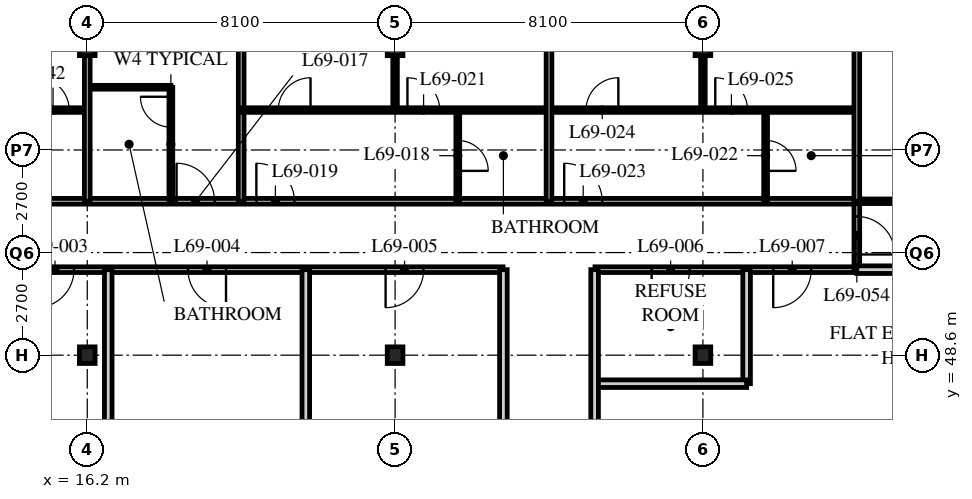
"""IFC4 building model, lengths in metres.
Left out: names, types, materials, properties, quantities, classifications, styles, units other than length and angle.
Written with IfcOpenShell. Run it as: python <this file> out.ifc"""

import sys

from ifc_helpers import new_model, si_unit, direction, frame, frame_2d, origin, origin_2d, place, context, subcontext, project, spatial, rectangle, i_section, extrude, element, fill, save


model = new_model("IFC4")
c1 = context("Model", 3, precision=1e-05, world=origin(), true_north=direction((0.0, 1.0)))
c2 = subcontext(c1, "Body", "Model", "MODEL_VIEW")
j1 = project(units=[si_unit("LENGTHUNIT", "METRE"), si_unit("PLANEANGLEUNIT", "RADIAN")], contexts=[c1])
p1 = place(None, origin())
s1 = spatial("IfcSite", under=j1, at=p1, CompositionType="ELEMENT")
p2 = place(p1, origin())
s2 = spatial("IfcBuilding", under=s1, at=p2, CompositionType="ELEMENT")
p3 = place(p2, frame((0.0, 0.0, 269.7)))
s3 = spatial("IfcBuildingStorey", under=s2, at=p3, CompositionType="ELEMENT", Elevation=269.7)
for number, where, z_axis, x_axis in (
    (1, (16.2, 48.6, 0.0), (0.0, 0.0, 1.0), (1.0, 0.0, 0.0)),
    (2, (16.2, 56.7, 0.0), (0.0, 0.0, 1.0), (1.0, 0.0, 0.0)),
    (3, (24.3, 48.6, 0.0), (0.0, 0.0, 1.0), (1.0, 0.0, 0.0)),
    (4, (24.3, 56.7, 0.0), (0.0, 0.0, 1.0), (1.0, 0.0, 0.0)),
    (5, (32.4, 48.6, 0.0), (0.0, 0.0, 1.0), (1.0, 0.0, 0.0)),
    (6, (32.4, 56.7, 0.0), (0.0, 0.0, 1.0), (1.0, 0.0, 0.0)),
):
    element("IfcColumn", number, at=place(p3, frame(where, z_axis=z_axis, x_axis=x_axis)), inside=s3, PredefinedType="COLUMN", context=c2, shape_type="SweptSolid", body=[
        extrude(i_section(OverallWidth=0.412, OverallDepth=0.437, WebThickness=0.036, FlangeThickness=0.058, FilletRadius=0.015, at=origin_2d()), origin(), (0.0, 0.0, 1.0), 3.9),
    ])
p4 = place(p3, frame((12.15, 52.65, 0.0), z_axis=(0.0, 0.0, 1.0), x_axis=(1.0, 0.0, 0.0)))
e7 = element("IfcWall", 7, at=p4, inside=s3, PredefinedType="PARTITIONING", context=c2, shape_type="SweptSolid", body=[
    extrude(rectangle(XDim=24.3, YDim=0.15, at=frame_2d((12.15, 0.0))), origin(), (0.0, 0.0, 1.0), 3.69),
])
p5 = place(p4, frame((6.4, 0.0, 0.0)))
e8 = element("IfcOpeningElement", 8, at=p5, cuts=e7, PredefinedType="OPENING", context=c2, shape_type="SweptSolid", body=[
    extrude(rectangle(XDim=1.0, YDim=2.1, at=frame_2d((0.5, 1.05))), frame((0.0, 0.085, 0.0), z_axis=(0.0, -1.0, 0.0), x_axis=(1.0, 0.0, 0.0)), (0.0, 0.0, 1.0), 0.17),
])
p6 = place(p4, frame((8.5, 0.0, 0.0)))
e9 = element("IfcOpeningElement", 9, at=p6, cuts=e7, PredefinedType="OPENING", context=c2, shape_type="SweptSolid", body=[
    extrude(rectangle(XDim=1.0, YDim=2.1, at=frame_2d((0.5, 1.05))), frame((0.0, 0.085, 0.0), z_axis=(0.0, -1.0, 0.0), x_axis=(1.0, 0.0, 0.0)), (0.0, 0.0, 1.0), 0.17),
])
p7 = place(p4, frame((16.6, 0.0, 0.0)))
e10 = element("IfcOpeningElement", 10, at=p7, cuts=e7, PredefinedType="OPENING", context=c2, shape_type="SweptSolid", body=[
    extrude(rectangle(XDim=1.0, YDim=2.1, at=frame_2d((0.5, 1.05))), frame((0.0, 0.085, 0.0), z_axis=(0.0, -1.0, 0.0), x_axis=(1.0, 0.0, 0.0)), (0.0, 0.0, 1.0), 0.17),
])
p8 = place(p4, frame((1.525, 0.0, 0.0)))
e11 = element("IfcOpeningElement", 11, at=p8, cuts=e7, PredefinedType="OPENING", context=c2, shape_type="SweptSolid", body=[
    extrude(rectangle(XDim=1.0, YDim=2.1, at=frame_2d((0.5, 1.05))), frame((0.0, 0.085, 0.0), z_axis=(0.0, -1.0, 0.0), x_axis=(1.0, 0.0, 0.0)), (0.0, 0.0, 1.0), 0.17),
])
p9 = place(p3, frame((13.95, 50.85, 0.0), z_axis=(0.0, 0.0, 1.0), x_axis=(1.0, 0.0, 0.0)))
e12 = element("IfcWall", 12, at=p9, inside=s3, PredefinedType="PARTITIONING", context=c2, shape_type="SweptSolid", body=[
    extrude(rectangle(XDim=13.19, YDim=0.15, at=frame_2d((6.595, 0.0))), origin(), (0.0, 0.0, 1.0), 3.69),
])
p10 = place(p9, frame((0.901, 0.0, 0.0)))
e13 = element("IfcOpeningElement", 13, at=p10, cuts=e12, PredefinedType="OPENING", context=c2, shape_type="SweptSolid", body=[
    extrude(rectangle(XDim=1.0, YDim=2.1, at=frame_2d((0.5, 1.05))), frame((0.0, 0.085, 0.0), z_axis=(0.0, -1.0, 0.0), x_axis=(1.0, 0.0, 0.0)), (0.0, 0.0, 1.0), 0.17),
])
p11 = place(p9, frame((4.901, 0.0, 0.0)))
e14 = element("IfcOpeningElement", 14, at=p11, cuts=e12, PredefinedType="OPENING", context=c2, shape_type="SweptSolid", body=[
    extrude(rectangle(XDim=1.0, YDim=2.1, at=frame_2d((0.5, 1.05))), frame((0.0, 0.085, 0.0), z_axis=(0.0, -1.0, 0.0), x_axis=(1.0, 0.0, 0.0)), (0.0, 0.0, 1.0), 0.17),
])
p12 = place(p9, frame((10.101, 0.0, 0.0)))
e15 = element("IfcOpeningElement", 15, at=p12, cuts=e12, PredefinedType="OPENING", context=c2, shape_type="SweptSolid", body=[
    extrude(rectangle(XDim=1.0, YDim=2.1, at=frame_2d((0.5, 1.05))), frame((0.0, 0.085, 0.0), z_axis=(0.0, -1.0, 0.0), x_axis=(1.0, 0.0, 0.0)), (0.0, 0.0, 1.0), 0.17),
])
p13 = place(p3, frame((29.56, 50.85, 0.0), z_axis=(0.0, 0.0, 1.0), x_axis=(1.0, 0.0, 0.0)))
e16 = element("IfcWall", 16, at=p13, inside=s3, PredefinedType="PARTITIONING", context=c2, shape_type="SweptSolid", body=[
    extrude(rectangle(XDim=6.89, YDim=0.15, at=frame_2d((3.445, 0.0))), origin(), (0.0, 0.0, 1.0), 3.69),
])
p14 = place(p13, frame((1.49, 0.0, 0.0)))
e17 = element("IfcOpeningElement", 17, at=p14, cuts=e16, PredefinedType="OPENING", context=c2, shape_type="SweptSolid", body=[
    extrude(rectangle(XDim=1.0, YDim=2.1, at=frame_2d((0.5, 1.05))), frame((0.0, 0.085, 0.0), z_axis=(0.0, -1.0, 0.0), x_axis=(1.0, 0.0, 0.0)), (0.0, 0.0, 1.0), 0.17),
])
p15 = place(p13, frame((4.69, 0.0, 0.0)))
e18 = element("IfcOpeningElement", 18, at=p15, cuts=e16, PredefinedType="OPENING", context=c2, shape_type="SweptSolid", body=[
    extrude(rectangle(XDim=1.0, YDim=2.1, at=frame_2d((0.5, 1.05))), frame((0.0, 0.085, 0.0), z_axis=(0.0, -1.0, 0.0), x_axis=(1.0, 0.0, 0.0)), (0.0, 0.0, 1.0), 0.17),
])
for number, where, z_axis, x_axis in (
    (19, (16.752, 50.85, 0.0), (0.0, 0.0, 1.0), (0.0, -1.0, 0.0)),
    (20, (21.951, 50.85, 0.0), (0.0, 0.0, 1.0), (0.0, -1.0, 0.0)),
):
    element("IfcWall", number, at=place(p3, frame(where, z_axis=z_axis, x_axis=x_axis)), inside=s3, PredefinedType="SOLIDWALL", context=c2, shape_type="SweptSolid", body=[
        extrude(rectangle(XDim=10.35, YDim=0.2, at=frame_2d((5.175, 0.0))), origin(), (0.0, 0.0, 1.0), 3.69),
    ])
p16 = place(p3, frame((33.55, 50.85, 0.0), z_axis=(0.0, 0.0, 1.0), x_axis=(0.0, -1.0, 0.0)))
e21 = element("IfcWall", 21, at=p16, inside=s3, PredefinedType="SOLIDWALL", context=c2, shape_type="SweptSolid", body=[
    extrude(rectangle(XDim=3.0, YDim=0.2, at=frame_2d((1.5, 0.0))), origin(), (0.0, 0.0, 1.0), 3.69),
])
p17 = place(p3, frame((29.55, 47.85, 0.0), z_axis=(0.0, 0.0, 1.0), x_axis=(1.0, 0.0, 0.0)))
e22 = element("IfcWall", 22, at=p17, inside=s3, PredefinedType="SOLIDWALL", context=c2, shape_type="SweptSolid", body=[
    extrude(rectangle(XDim=4.0, YDim=0.2, at=frame_2d((2.0, 0.0))), origin(), (0.0, 0.0, 1.0), 3.69),
])
for number, where, z_axis, x_axis in (
    (23, (27.15, 40.5, 0.0), (0.0, 0.0, 1.0), (0.0, 1.0, 0.0)),
    (24, (29.55, 40.5, 0.0), (0.0, 0.0, 1.0), (0.0, 1.0, 0.0)),
):
    element("IfcWall", number, at=place(p3, frame(where, z_axis=z_axis, x_axis=x_axis)), inside=s3, PredefinedType="SOLIDWALL", context=c2, shape_type="SweptSolid", body=[
        extrude(rectangle(XDim=10.35, YDim=0.2, at=frame_2d((5.175, 0.0))), origin(), (0.0, 0.0, 1.0), 3.69),
    ])
p18 = place(p3, frame((36.45, 50.85, 0.0), z_axis=(0.0, 0.0, 1.0), x_axis=(0.0, 1.0, 0.0)))
e25 = element("IfcWall", 25, at=p18, inside=s3, PredefinedType="PARTITIONING", context=c2, shape_type="SweptSolid", body=[
    extrude(rectangle(XDim=1.8, YDim=0.15, at=frame_2d((0.9, 0.0))), origin(), (0.0, 0.0, 1.0), 3.69),
])
p19 = place(p18, frame((0.4, 0.0, 0.0)))
e26 = element("IfcOpeningElement", 26, at=p19, cuts=e25, PredefinedType="OPENING", context=c2, shape_type="SweptSolid", body=[
    extrude(rectangle(XDim=1.0, YDim=2.1, at=frame_2d((0.5, 1.05))), frame((0.0, 0.085, 0.0), z_axis=(0.0, -1.0, 0.0), x_axis=(1.0, 0.0, 0.0)), (0.0, 0.0, 1.0), 0.17),
])
p20 = place(p3, frame((16.2, 55.65, 0.0), z_axis=(0.0, 0.0, 1.0), x_axis=(1.0, 0.0, 0.0)))
e27 = element("IfcWall", 27, at=p20, inside=s3, PredefinedType="PARTITIONING", context=c2, shape_type="SweptSolid", body=[
    extrude(rectangle(XDim=2.2, YDim=0.1, at=frame_2d((1.1, 0.0))), origin(), (0.0, 0.0, 1.0), 3.69),
])
p21 = place(p3, frame((18.4, 52.65, 0.0), z_axis=(0.0, 0.0, 1.0), x_axis=(0.0, 1.0, 0.0)))
e28 = element("IfcWall", 28, at=p21, inside=s3, PredefinedType="PARTITIONING", context=c2, shape_type="SweptSolid", body=[
    extrude(rectangle(XDim=3.0, YDim=0.1, at=frame_2d((1.5, 0.0))), origin(), (0.0, 0.0, 1.0), 3.69),
])
p22 = place(p21, frame((1.95, 0.0, 0.0)))
e29 = element("IfcOpeningElement", 29, at=p22, cuts=e28, PredefinedType="OPENING", context=c2, shape_type="SweptSolid", body=[
    extrude(rectangle(XDim=0.8, YDim=2.1, at=frame_2d((0.4, 1.05))), frame((0.0, 0.06, 0.0), z_axis=(0.0, -1.0, 0.0), x_axis=(1.0, 0.0, 0.0)), (0.0, 0.0, 1.0), 0.12),
])
p23 = place(p3, frame((20.25, 52.65, 0.0), z_axis=(0.0, 0.0, 1.0), x_axis=(0.0, 1.0, 0.0)))
e30 = element("IfcWall", 30, at=p23, inside=s3, PredefinedType="PARTITIONING", context=c2, shape_type="SweptSolid", body=[
    extrude(rectangle(XDim=11.85, YDim=0.15, at=frame_2d((5.925, 0.0))), origin(), (0.0, 0.0, 1.0), 3.69),
])
p24 = place(p3, frame((20.25, 55.05, 0.0), z_axis=(0.0, 0.0, 1.0), x_axis=(1.0, 0.0, 0.0)))
e31 = element("IfcWall", 31, at=p24, inside=s3, PredefinedType="PARTITIONING", context=c2, shape_type="SweptSolid", body=[
    extrude(rectangle(XDim=16.2, YDim=0.12, at=frame_2d((8.1, 0.0))), origin(), (0.0, 0.0, 1.0), 3.69),
])
p25 = place(p24, frame((0.975, 0.0, 0.0)))
e32 = element("IfcOpeningElement", 32, at=p25, cuts=e31, PredefinedType="OPENING", context=c2, shape_type="SweptSolid", body=[
    extrude(rectangle(XDim=0.85, YDim=2.1, at=frame_2d((0.425, 1.05))), frame((0.0, 0.07, 0.0), z_axis=(0.0, -1.0, 0.0), x_axis=(1.0, 0.0, 0.0)), (0.0, 0.0, 1.0), 0.14),
])
p26 = place(p24, frame((4.375, 0.0, 0.0)))
e33 = element("IfcOpeningElement", 33, at=p26, cuts=e31, PredefinedType="OPENING", context=c2, shape_type="SweptSolid", body=[
    extrude(rectangle(XDim=0.85, YDim=2.1, at=frame_2d((0.425, 1.05))), frame((0.0, 0.07, 0.0), z_axis=(0.0, -1.0, 0.0), x_axis=(1.0, 0.0, 0.0)), (0.0, 0.0, 1.0), 0.14),
])
p27 = place(p24, frame((9.075, 0.0, 0.0)))
e34 = element("IfcOpeningElement", 34, at=p27, cuts=e31, PredefinedType="OPENING", context=c2, shape_type="SweptSolid", body=[
    extrude(rectangle(XDim=0.85, YDim=2.1, at=frame_2d((0.425, 1.05))), frame((0.0, 0.07, 0.0), z_axis=(0.0, -1.0, 0.0), x_axis=(1.0, 0.0, 0.0)), (0.0, 0.0, 1.0), 0.14),
])
p28 = place(p24, frame((12.475, 0.0, 0.0)))
e35 = element("IfcOpeningElement", 35, at=p28, cuts=e31, PredefinedType="OPENING", context=c2, shape_type="SweptSolid", body=[
    extrude(rectangle(XDim=0.85, YDim=2.1, at=frame_2d((0.425, 1.05))), frame((0.0, 0.07, 0.0), z_axis=(0.0, -1.0, 0.0), x_axis=(1.0, 0.0, 0.0)), (0.0, 0.0, 1.0), 0.14),
])
p29 = place(p3, frame((25.95, 52.65, 0.0), z_axis=(0.0, 0.0, 1.0), x_axis=(0.0, 1.0, 0.0)))
e36 = element("IfcWall", 36, at=p29, inside=s3, PredefinedType="PARTITIONING", context=c2, shape_type="SweptSolid", body=[
    extrude(rectangle(XDim=2.4, YDim=0.1, at=frame_2d((1.2, 0.0))), origin(), (0.0, 0.0, 1.0), 3.69),
])
p30 = place(p29, frame((0.8, 0.0, 0.0)))
e37 = element("IfcOpeningElement", 37, at=p30, cuts=e36, PredefinedType="OPENING", context=c2, shape_type="SweptSolid", body=[
    extrude(rectangle(XDim=0.8, YDim=2.1, at=frame_2d((0.4, 1.05))), frame((0.0, 0.06, 0.0), z_axis=(0.0, -1.0, 0.0), x_axis=(1.0, 0.0, 0.0)), (0.0, 0.0, 1.0), 0.12),
])
p31 = place(p3, frame((24.3, 55.05, 0.0), z_axis=(0.0, 0.0, 1.0), x_axis=(0.0, 1.0, 0.0)))
e38 = element("IfcWall", 38, at=p31, inside=s3, PredefinedType="PARTITIONING", context=c2, shape_type="SweptSolid", body=[
    extrude(rectangle(XDim=9.45, YDim=0.12, at=frame_2d((4.725, 0.0))), origin(), (0.0, 0.0, 1.0), 3.078),
])
p32 = place(p3, frame((28.35, 52.65, 0.0), z_axis=(0.0, 0.0, 1.0), x_axis=(0.0, 1.0, 0.0)))
e39 = element("IfcWall", 39, at=p32, inside=s3, PredefinedType="PARTITIONING", context=c2, shape_type="SweptSolid", body=[
    extrude(rectangle(XDim=11.85, YDim=0.15, at=frame_2d((5.925, 0.0))), origin(), (0.0, 0.0, 1.0), 3.69),
])
p33 = place(p3, frame((34.05, 52.65, 0.0), z_axis=(0.0, 0.0, 1.0), x_axis=(0.0, 1.0, 0.0)))
e40 = element("IfcWall", 40, at=p33, inside=s3, PredefinedType="PARTITIONING", context=c2, shape_type="SweptSolid", body=[
    extrude(rectangle(XDim=2.4, YDim=0.1, at=frame_2d((1.2, 0.0))), origin(), (0.0, 0.0, 1.0), 3.69),
])
p34 = place(p33, frame((0.8, 0.0, 0.0)))
e41 = element("IfcOpeningElement", 41, at=p34, cuts=e40, PredefinedType="OPENING", context=c2, shape_type="SweptSolid", body=[
    extrude(rectangle(XDim=0.8, YDim=2.1, at=frame_2d((0.4, 1.05))), frame((0.0, 0.06, 0.0), z_axis=(0.0, -1.0, 0.0), x_axis=(1.0, 0.0, 0.0)), (0.0, 0.0, 1.0), 0.12),
])
p35 = place(p3, frame((32.4, 55.05, 0.0), z_axis=(0.0, 0.0, 1.0), x_axis=(0.0, 1.0, 0.0)))
e42 = element("IfcWall", 42, at=p35, inside=s3, PredefinedType="PARTITIONING", context=c2, shape_type="SweptSolid", body=[
    extrude(rectangle(XDim=9.45, YDim=0.12, at=frame_2d((4.725, 0.0))), origin(), (0.0, 0.0, 1.0), 3.078),
])
p36 = place(p3, frame((8.15, 55.05, 0.0), z_axis=(0.0, 0.0, 1.0), x_axis=(1.0, 0.0, 0.0)))
e43 = element("IfcWall", 43, at=p36, inside=s3, PredefinedType="PARTITIONING", context=c2, shape_type="SweptSolid", body=[
    extrude(rectangle(XDim=8.05, YDim=0.12, at=frame_2d((4.025, 0.0))), origin(), (0.0, 0.0, 1.0), 3.69),
])
p37 = place(p36, frame((6.725, 0.0, 0.0)))
e44 = element("IfcOpeningElement", 44, at=p37, cuts=e43, PredefinedType="OPENING", context=c2, shape_type="SweptSolid", body=[
    extrude(rectangle(XDim=0.85, YDim=2.1, at=frame_2d((0.425, 1.05))), frame((0.0, 0.07, 0.0), z_axis=(0.0, -1.0, 0.0), x_axis=(1.0, 0.0, 0.0)), (0.0, 0.0, 1.0), 0.14),
])
p38 = place(p36, frame((2.875, 0.0, 0.0)))
e45 = element("IfcOpeningElement", 45, at=p38, cuts=e43, PredefinedType="OPENING", context=c2, shape_type="SweptSolid", body=[
    extrude(rectangle(XDim=0.85, YDim=2.1, at=frame_2d((0.425, 1.05))), frame((0.0, 0.07, 0.0), z_axis=(0.0, -1.0, 0.0), x_axis=(1.0, 0.0, 0.0)), (0.0, 0.0, 1.0), 0.14),
])
p39 = place(p3, frame((16.2, 52.65, 0.0), z_axis=(0.0, 0.0, 1.0), x_axis=(0.0, 1.0, 0.0)))
e46 = element("IfcWall", 46, at=p39, inside=s3, PredefinedType="PARTITIONING", context=c2, shape_type="SweptSolid", body=[
    extrude(rectangle(XDim=11.85, YDim=0.15, at=frame_2d((5.925, 0.0))), origin(), (0.0, 0.0, 1.0), 3.078),
])
p40 = place(p3, frame((36.45, 52.65, 0.0), z_axis=(0.0, 0.0, 1.0), x_axis=(1.0, 0.0, 0.0)))
e47 = element("IfcWall", 47, at=p40, inside=s3, PredefinedType="PARTITIONING", context=c2, shape_type="SweptSolid", body=[
    extrude(rectangle(XDim=6.45, YDim=0.12, at=frame_2d((3.225, 0.0))), origin(), (0.0, 0.0, 1.0), 3.69),
])
p41 = place(p40, frame((2.8, 0.0, 0.0)))
e48 = element("IfcOpeningElement", 48, at=p41, cuts=e47, PredefinedType="OPENING", context=c2, shape_type="SweptSolid", body=[
    extrude(rectangle(XDim=0.85, YDim=2.1, at=frame_2d((0.425, 1.05))), frame((0.0, 0.07, 0.0), z_axis=(0.0, -1.0, 0.0), x_axis=(1.0, 0.0, 0.0)), (0.0, 0.0, 1.0), 0.14),
])
p42 = place(p3, frame((36.45, 50.85, 0.0), z_axis=(0.0, 0.0, 1.0), x_axis=(1.0, 0.0, 0.0)))
e49 = element("IfcWall", 49, at=p42, inside=s3, PredefinedType="SOLIDWALL", context=c2, shape_type="SweptSolid", body=[
    extrude(rectangle(XDim=4.05, YDim=0.2, at=frame_2d((2.025, 0.0))), origin(), (0.0, 0.0, 1.0), 3.69),
])
p43 = place(p3, frame((36.45, 64.5, 0.0), z_axis=(0.0, 0.0, 1.0), x_axis=(0.0, -1.0, 0.0)))
e50 = element("IfcWall", 50, at=p43, inside=s3, PredefinedType="PARTITIONING", context=c2, shape_type="SweptSolid", body=[
    extrude(rectangle(XDim=11.85, YDim=0.15, at=frame_2d((5.925, 0.0))), origin(), (0.0, 0.0, 1.0), 3.69),
])
p44 = place(p10, origin())
e51 = element("IfcDoor", 51, at=p44, inside=s3, OperationType="SINGLE_SWING_RIGHT", PredefinedType="DOOR", context=c2, shape_type="SweptSolid", body=[
    extrude(rectangle(XDim=1.0, YDim=2.1, at=frame_2d((0.5, 1.05))), frame((0.0, 0.025, 0.0), z_axis=(0.0, -1.0, 0.0), x_axis=(1.0, 0.0, 0.0)), (0.0, 0.0, 1.0), 0.05),
])
fill(e13, e51)
p45 = place(p11, origin())
e52 = element("IfcDoor", 52, at=p45, inside=s3, OperationType="SINGLE_SWING_LEFT", PredefinedType="DOOR", context=c2, shape_type="SweptSolid", body=[
    extrude(rectangle(XDim=1.0, YDim=2.1, at=frame_2d((0.5, 1.05))), frame((0.0, 0.025, 0.0), z_axis=(0.0, -1.0, 0.0), x_axis=(1.0, 0.0, 0.0)), (0.0, 0.0, 1.0), 0.05),
])
fill(e14, e52)
p46 = place(p12, origin())
e53 = element("IfcDoor", 53, at=p46, inside=s3, OperationType="SINGLE_SWING_RIGHT", PredefinedType="DOOR", context=c2, shape_type="SweptSolid", body=[
    extrude(rectangle(XDim=1.0, YDim=2.1, at=frame_2d((0.5, 1.05))), frame((0.0, 0.025, 0.0), z_axis=(0.0, -1.0, 0.0), x_axis=(1.0, 0.0, 0.0)), (0.0, 0.0, 1.0), 0.05),
])
fill(e15, e53)
p47 = place(p14, origin())
e54 = element("IfcDoor", 54, at=p47, inside=s3, OperationType="SINGLE_SWING_RIGHT", PredefinedType="DOOR", context=c2, shape_type="SweptSolid", body=[
    extrude(rectangle(XDim=1.0, YDim=2.1, at=frame_2d((0.5, 1.05))), frame((0.0, 0.025, 0.0), z_axis=(0.0, -1.0, 0.0), x_axis=(1.0, 0.0, 0.0)), (0.0, 0.0, 1.0), 0.05),
])
fill(e17, e54)
p48 = place(p15, origin())
e55 = element("IfcDoor", 55, at=p48, inside=s3, OperationType="SINGLE_SWING_RIGHT", PredefinedType="DOOR", context=c2, shape_type="SweptSolid", body=[
    extrude(rectangle(XDim=1.0, YDim=2.1, at=frame_2d((0.5, 1.05))), frame((0.0, 0.025, 0.0), z_axis=(0.0, -1.0, 0.0), x_axis=(1.0, 0.0, 0.0)), (0.0, 0.0, 1.0), 0.05),
])
fill(e18, e55)
p49 = place(p22, origin())
e56 = element("IfcDoor", 56, at=p49, inside=s3, OperationType="SINGLE_SWING_RIGHT", PredefinedType="DOOR", context=c2, shape_type="SweptSolid", body=[
    extrude(rectangle(XDim=0.8, YDim=2.1, at=frame_2d((0.4, 1.05))), frame((0.0, 0.025, 0.0), z_axis=(0.0, -1.0, 0.0), x_axis=(1.0, 0.0, 0.0)), (0.0, 0.0, 1.0), 0.05),
])
fill(e29, e56)
p50 = place(p5, origin())
e57 = element("IfcDoor", 57, at=p50, inside=s3, OperationType="SINGLE_SWING_LEFT", PredefinedType="DOOR", context=c2, shape_type="SweptSolid", body=[
    extrude(rectangle(XDim=1.0, YDim=2.1, at=frame_2d((0.5, 1.05))), frame((0.0, 0.025, 0.0), z_axis=(0.0, -1.0, 0.0), x_axis=(1.0, 0.0, 0.0)), (0.0, 0.0, 1.0), 0.05),
])
fill(e8, e57)
p51 = place(p30, origin())
e58 = element("IfcDoor", 58, at=p51, inside=s3, OperationType="SINGLE_SWING_RIGHT", PredefinedType="DOOR", context=c2, shape_type="SweptSolid", body=[
    extrude(rectangle(XDim=0.8, YDim=2.1, at=frame_2d((0.4, 1.05))), frame((0.0, 0.025, 0.0), z_axis=(0.0, -1.0, 0.0), x_axis=(1.0, 0.0, 0.0)), (0.0, 0.0, 1.0), 0.05),
])
fill(e37, e58)
p52 = place(p6, origin())
e59 = element("IfcDoor", 59, at=p52, inside=s3, OperationType="SINGLE_SWING_LEFT", PredefinedType="DOOR", context=c2, shape_type="SweptSolid", body=[
    extrude(rectangle(XDim=1.0, YDim=2.1, at=frame_2d((0.5, 1.05))), frame((0.0, 0.025, 0.0), z_axis=(0.0, -1.0, 0.0), x_axis=(1.0, 0.0, 0.0)), (0.0, 0.0, 1.0), 0.05),
])
fill(e9, e59)
p53 = place(p25, origin())
e60 = element("IfcDoor", 60, at=p53, inside=s3, OperationType="SINGLE_SWING_RIGHT", PredefinedType="DOOR", context=c2, shape_type="SweptSolid", body=[
    extrude(rectangle(XDim=0.85, YDim=2.1, at=frame_2d((0.425, 1.05))), frame((0.0, 0.025, 0.0), z_axis=(0.0, -1.0, 0.0), x_axis=(1.0, 0.0, 0.0)), (0.0, 0.0, 1.0), 0.05),
])
fill(e32, e60)
p54 = place(p26, origin())
e61 = element("IfcDoor", 61, at=p54, inside=s3, OperationType="SINGLE_SWING_LEFT", PredefinedType="DOOR", context=c2, shape_type="SweptSolid", body=[
    extrude(rectangle(XDim=0.85, YDim=2.1, at=frame_2d((0.425, 1.05))), frame((0.0, 0.025, 0.0), z_axis=(0.0, -1.0, 0.0), x_axis=(1.0, 0.0, 0.0)), (0.0, 0.0, 1.0), 0.05),
])
fill(e33, e61)
p55 = place(p34, origin())
e62 = element("IfcDoor", 62, at=p55, inside=s3, OperationType="SINGLE_SWING_RIGHT", PredefinedType="DOOR", context=c2, shape_type="SweptSolid", body=[
    extrude(rectangle(XDim=0.8, YDim=2.1, at=frame_2d((0.4, 1.05))), frame((0.0, 0.025, 0.0), z_axis=(0.0, -1.0, 0.0), x_axis=(1.0, 0.0, 0.0)), (0.0, 0.0, 1.0), 0.05),
])
fill(e41, e62)
p56 = place(p7, origin())
e63 = element("IfcDoor", 63, at=p56, inside=s3, OperationType="SINGLE_SWING_LEFT", PredefinedType="DOOR", context=c2, shape_type="SweptSolid", body=[
    extrude(rectangle(XDim=1.0, YDim=2.1, at=frame_2d((0.5, 1.05))), frame((0.0, 0.025, 0.0), z_axis=(0.0, -1.0, 0.0), x_axis=(1.0, 0.0, 0.0)), (0.0, 0.0, 1.0), 0.05),
])
fill(e10, e63)
p57 = place(p27, origin())
e64 = element("IfcDoor", 64, at=p57, inside=s3, OperationType="SINGLE_SWING_RIGHT", PredefinedType="DOOR", context=c2, shape_type="SweptSolid", body=[
    extrude(rectangle(XDim=0.85, YDim=2.1, at=frame_2d((0.425, 1.05))), frame((0.0, 0.025, 0.0), z_axis=(0.0, -1.0, 0.0), x_axis=(1.0, 0.0, 0.0)), (0.0, 0.0, 1.0), 0.05),
])
fill(e34, e64)
p58 = place(p28, origin())
e65 = element("IfcDoor", 65, at=p58, inside=s3, OperationType="SINGLE_SWING_LEFT", PredefinedType="DOOR", context=c2, shape_type="SweptSolid", body=[
    extrude(rectangle(XDim=0.85, YDim=2.1, at=frame_2d((0.425, 1.05))), frame((0.0, 0.025, 0.0), z_axis=(0.0, -1.0, 0.0), x_axis=(1.0, 0.0, 0.0)), (0.0, 0.0, 1.0), 0.05),
])
fill(e35, e65)
p59 = place(p37, origin())
e66 = element("IfcDoor", 66, at=p59, inside=s3, OperationType="SINGLE_SWING_LEFT", PredefinedType="DOOR", context=c2, shape_type="SweptSolid", body=[
    extrude(rectangle(XDim=0.85, YDim=2.1, at=frame_2d((0.425, 1.05))), frame((0.0, 0.025, 0.0), z_axis=(0.0, -1.0, 0.0), x_axis=(1.0, 0.0, 0.0)), (0.0, 0.0, 1.0), 0.05),
])
fill(e44, e66)
p60 = place(p19, origin())
e67 = element("IfcDoor", 67, at=p60, inside=s3, OperationType="SINGLE_SWING_RIGHT", PredefinedType="DOOR", context=c2, shape_type="SweptSolid", body=[
    extrude(rectangle(XDim=1.0, YDim=2.1, at=frame_2d((0.5, 1.05))), frame((0.0, 0.025, 0.0), z_axis=(0.0, -1.0, 0.0), x_axis=(1.0, 0.0, 0.0)), (0.0, 0.0, 1.0), 0.05),
])
fill(e26, e67)
save(model, sys.argv[1])
